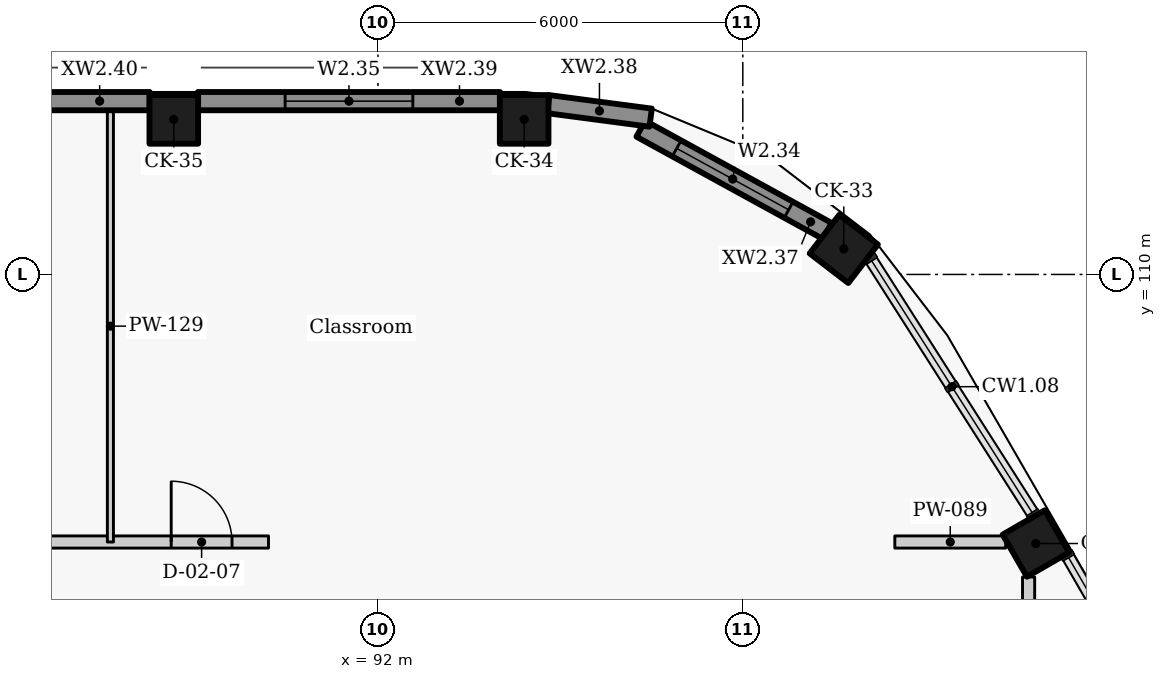
"""IFC4 building model, lengths in metres.
Left out: names, types, materials, properties, quantities, classifications, styles, units other than length and angle.
Written with IfcOpenShell. Run it as: python <this file> out.ifc"""

import sys

from ifc_helpers import new_model, si_unit, direction, frame, frame_2d, origin, origin_2d, place, context, subcontext, project, spatial, rectangle, extrude, element, fill, save


model = new_model("IFC4")
c1 = context("Model", 3, precision=1e-05, world=origin(), true_north=direction((0.0, 1.0)))
c2 = subcontext(c1, "Body", "Model", "MODEL_VIEW")
j1 = project(units=[si_unit("LENGTHUNIT", "METRE"), si_unit("PLANEANGLEUNIT", "RADIAN")], contexts=[c1])
p1 = place(None, origin())
s1 = spatial("IfcSite", under=j1, at=p1, CompositionType="ELEMENT")
p2 = place(p1, origin())
s2 = spatial("IfcBuilding", under=s1, at=p2, CompositionType="ELEMENT")
p3 = place(p2, frame((0.0, 0.0, 19.8)))
s3 = spatial("IfcBuildingStorey", under=s2, at=p3, CompositionType="ELEMENT", Elevation=19.8)
for number, where, z_axis, x_axis in (
    (1, (102.82, 105.575, 0.0), (0.0, 0.0, 1.0), (-0.5, 0.866, 0.0)),
    (2, (99.661, 110.419, 0.0), (0.0, 0.0, 1.0), (-0.793, 0.609, 0.0)),
    (3, (94.404, 112.55, 0.0), (0.0, 0.0, 1.0), (-1.0, 0.0, 0.0)),
    (4, (88.643, 112.55, 0.0), (0.0, 0.0, 1.0), (-1.0, 0.0, 0.0)),
):
    element("IfcColumn", number, at=place(p3, frame(where, z_axis=z_axis, x_axis=x_axis)), inside=s3, PredefinedType="COLUMN", context=c2, shape_type="SweptSolid", body=[
        extrude(rectangle(XDim=0.8, YDim=0.8, at=origin_2d()), origin(), (0.0, 0.0, 1.0), 4.2),
    ])
p4 = place(p3, frame((99.389, 110.715, 0.0), z_axis=(0.0, 0.0, 1.0), x_axis=(-0.876785818174, 0.480881096581, 0.0)))
e5 = element("IfcWall", 5, at=p4, inside=s3, PredefinedType="SOLIDWALL", context=c2, shape_type="SweptSolid", body=[
    extrude(rectangle(XDim=3.497, YDim=0.3, at=frame_2d((1.748, 0.0))), origin(), (0.0, 0.0, 1.0), 3.0),
])
p5 = place(p4, frame((0.723, 0.0, 0.9)))
e6 = element("IfcOpeningElement", 6, at=p5, cuts=e5, PredefinedType="OPENING", context=c2, shape_type="SweptSolid", body=[
    extrude(rectangle(XDim=2.1, YDim=2.05, at=frame_2d((1.05, 1.025))), frame((0.0, 0.16, 0.0), z_axis=(0.0, -1.0, 0.0), x_axis=(1.0, 0.0, 0.0)), (0.0, 0.0, 1.0), 0.32),
])
p6 = place(p3, frame((96.485, 112.579, 0.0), z_axis=(0.0, 0.0, 1.0), x_axis=(-0.991431291018, 0.130629227937, 0.0)))
e7 = element("IfcWall", 7, at=p6, inside=s3, PredefinedType="SOLIDWALL", context=c2, shape_type="SweptSolid", body=[
    extrude(rectangle(XDim=1.699, YDim=0.3, at=frame_2d((0.85, 0.0))), origin(), (0.0, 0.0, 1.0), 3.0),
])
p7 = place(p3, frame((94.008, 112.85, 0.0), z_axis=(0.0, 0.0, 1.0), x_axis=(-1.0, 0.0, 0.0)))
e8 = element("IfcWall", 8, at=p7, inside=s3, PredefinedType="SOLIDWALL", context=c2, shape_type="SweptSolid", body=[
    extrude(rectangle(XDim=4.97, YDim=0.3, at=frame_2d((2.485, 0.0))), origin(), (0.0, 0.0, 1.0), 3.0),
])
p8 = place(p7, frame((1.435, 0.0, 0.9)))
e9 = element("IfcOpeningElement", 9, at=p8, cuts=e8, PredefinedType="OPENING", context=c2, shape_type="SweptSolid", body=[
    extrude(rectangle(XDim=2.1, YDim=2.05, at=frame_2d((1.05, 1.025))), frame((0.0, 0.16, 0.0), z_axis=(0.0, -1.0, 0.0), x_axis=(1.0, 0.0, 0.0)), (0.0, 0.0, 1.0), 0.32),
])
p9 = place(p3, frame((88.247, 112.85, 0.0), z_axis=(0.0, 0.0, 1.0), x_axis=(-1.0, 0.0, 0.0)))
e10 = element("IfcWall", 10, at=p9, inside=s3, PredefinedType="SOLIDWALL", context=c2, shape_type="SweptSolid", body=[
    extrude(rectangle(XDim=4.97, YDim=0.3, at=frame_2d((2.485, 0.0))), origin(), (0.0, 0.0, 1.0), 3.0),
])
p10 = place(p9, frame((1.746, 0.0, 0.9)))
e11 = element("IfcOpeningElement", 11, at=p10, cuts=e10, PredefinedType="OPENING", context=c2, shape_type="SweptSolid", body=[
    extrude(rectangle(XDim=2.1, YDim=2.05, at=frame_2d((1.05, 1.025))), frame((0.0, 0.16, 0.0), z_axis=(0.0, -1.0, 0.0), x_axis=(1.0, 0.0, 0.0)), (0.0, 0.0, 1.0), 0.32),
])
p11 = place(p3, frame((102.7, 105.025, 0.0), z_axis=(0.0, 0.0, 1.0), x_axis=(0.0, -1.0, 0.0)))
e12 = element("IfcWall", 12, at=p11, inside=s3, PredefinedType="PARTITIONING", context=c2, shape_type="SweptSolid", body=[
    extrude(rectangle(XDim=6.578, YDim=0.2, at=frame_2d((3.289, 0.0))), origin(), (0.0, 0.0, 1.0), 3.9),
])
p12 = place(p11, frame((2.539, 0.0, 0.0)))
e13 = element("IfcOpeningElement", 13, at=p12, cuts=e12, PredefinedType="OPENING", context=c2, shape_type="SweptSolid", body=[
    extrude(rectangle(XDim=1.5, YDim=2.1, at=frame_2d((0.75, 1.05))), frame((0.0, 0.11, 0.0), z_axis=(0.0, -1.0, 0.0), x_axis=(1.0, 0.0, 0.0)), (0.0, 0.0, 1.0), 0.22),
])
p13 = place(p3, frame((69.8, 105.6, 0.0), z_axis=(0.0, 0.0, 1.0), x_axis=(1.0, 0.0, 0.0)))
e14 = element("IfcWall", 14, at=p13, inside=s3, PredefinedType="PARTITIONING", context=c2, shape_type="SweptSolid", body=[
    extrude(rectangle(XDim=20.4, YDim=0.2, at=frame_2d((10.2, 0.0))), origin(), (0.0, 0.0, 1.0), 3.9),
])
p14 = place(p13, frame((0.602, 0.0, 0.0)))
e15 = element("IfcOpeningElement", 15, at=p14, cuts=e14, PredefinedType="OPENING", context=c2, shape_type="SweptSolid", body=[
    extrude(rectangle(XDim=1.0, YDim=2.1, at=frame_2d((0.5, 1.05))), frame((0.0, 0.11, 0.0), z_axis=(0.0, -1.0, 0.0), x_axis=(1.0, 0.0, 0.0)), (0.0, 0.0, 1.0), 0.22),
])
p15 = place(p13, frame((18.8, 0.0, 0.0)))
e16 = element("IfcOpeningElement", 16, at=p15, cuts=e14, PredefinedType="OPENING", context=c2, shape_type="SweptSolid", body=[
    extrude(rectangle(XDim=1.0, YDim=2.1, at=frame_2d((0.5, 1.05))), frame((0.0, 0.11, 0.0), z_axis=(0.0, -1.0, 0.0), x_axis=(1.0, 0.0, 0.0)), (0.0, 0.0, 1.0), 0.22),
])
p16 = place(p13, frame((10.3, 0.0, 0.0)))
e17 = element("IfcOpeningElement", 17, at=p16, cuts=e14, PredefinedType="OPENING", context=c2, shape_type="SweptSolid", body=[
    extrude(rectangle(XDim=1.0, YDim=2.1, at=frame_2d((0.5, 1.05))), frame((0.0, 0.11, 0.0), z_axis=(0.0, -1.0, 0.0), x_axis=(1.0, 0.0, 0.0)), (0.0, 0.0, 1.0), 0.22),
])
p17 = place(p3, frame((100.5, 105.6, 0.0), z_axis=(0.0, 0.0, 1.0), x_axis=(1.0, 0.0, 0.0)))
e18 = element("IfcWall", 18, at=p17, inside=s3, PredefinedType="PARTITIONING", context=c2, shape_type="SweptSolid", body=[
    extrude(rectangle(XDim=1.823, YDim=0.2, at=frame_2d((0.912, 0.0))), origin(), (0.0, 0.0, 1.0), 3.9),
])
p18 = place(p3, frame((87.6, 105.6, 0.0), z_axis=(0.0, 0.0, 1.0), x_axis=(0.0, 1.0, 0.0)))
e19 = element("IfcWall", 19, at=p18, inside=s3, PredefinedType="PARTITIONING", context=c2, shape_type="SweptSolid", body=[
    extrude(rectangle(XDim=7.1, YDim=0.1, at=frame_2d((3.55, 0.0))), origin(), (0.0, 0.0, 1.0), 3.13),
])
p19 = place(p5, origin())
e20 = element("IfcWindow", 20, at=p19, inside=s3, PartitioningType="SINGLE_PANEL", PredefinedType="WINDOW", context=c2, shape_type="SweptSolid", body=[
    extrude(rectangle(XDim=2.1, YDim=2.05, at=frame_2d((1.05, 1.025))), frame((0.0, 0.03, 0.0), z_axis=(0.0, -1.0, 0.0), x_axis=(1.0, 0.0, 0.0)), (0.0, 0.0, 1.0), 0.06),
])
fill(e6, e20)
p20 = place(p8, origin())
e21 = element("IfcWindow", 21, at=p20, inside=s3, PartitioningType="SINGLE_PANEL", PredefinedType="WINDOW", context=c2, shape_type="SweptSolid", body=[
    extrude(rectangle(XDim=2.1, YDim=2.05, at=frame_2d((1.05, 1.025))), frame((0.0, 0.03, 0.0), z_axis=(0.0, -1.0, 0.0), x_axis=(1.0, 0.0, 0.0)), (0.0, 0.0, 1.0), 0.06),
])
fill(e9, e21)
p21 = place(p15, origin())
e22 = element("IfcDoor", 22, at=p21, inside=s3, OperationType="SINGLE_SWING_LEFT", PredefinedType="DOOR", context=c2, shape_type="SweptSolid", body=[
    extrude(rectangle(XDim=1.0, YDim=2.1, at=frame_2d((0.5, 1.05))), frame((0.0, 0.025, 0.0), z_axis=(0.0, -1.0, 0.0), x_axis=(1.0, 0.0, 0.0)), (0.0, 0.0, 1.0), 0.05),
])
fill(e16, e22)
save(model, sys.argv[1])
